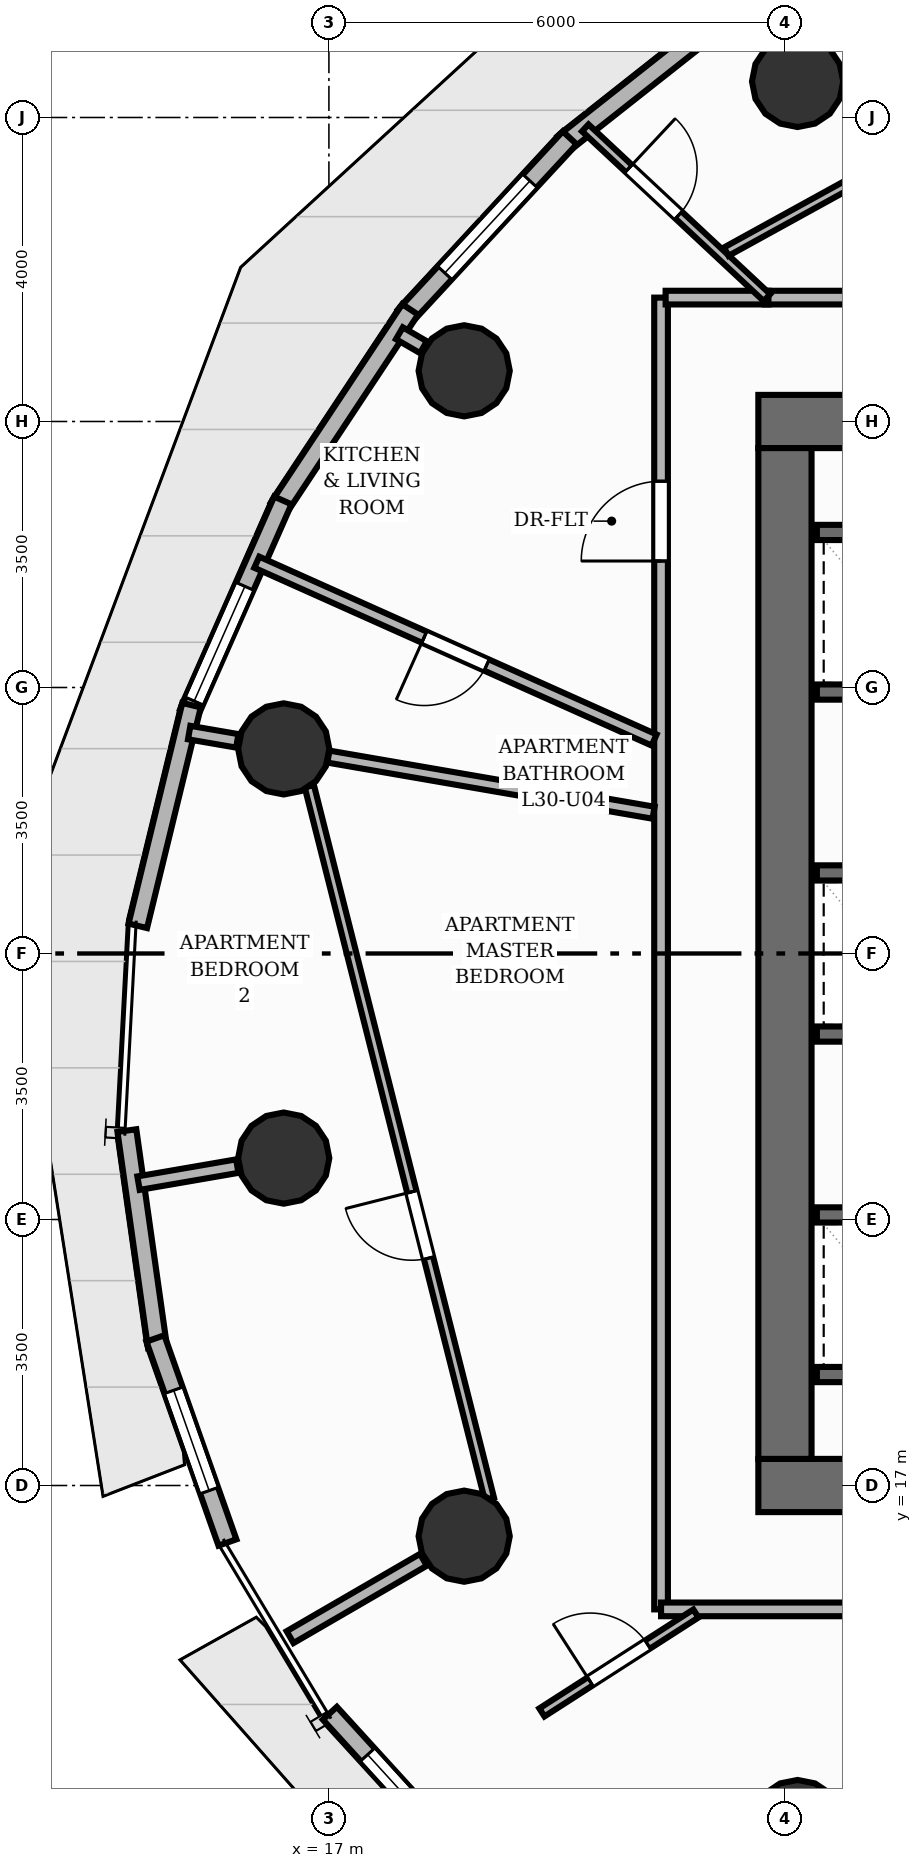
"""IFC4 building model, lengths in metres.
Left out: names, types, materials, properties, quantities, classifications, styles, units other than length and angle.
Written with IfcOpenShell. Run it as: python <this file> out.ifc"""

import sys

from ifc_helpers import new_model, si_unit, direction, frame, frame_2d, origin, origin_2d, place, context, subcontext, project, spatial, rectangle, circle, extrude, element, fill, save


model = new_model("IFC4")
c1 = context("Model", 3, precision=1e-05, world=origin(), true_north=direction((0.0, 1.0)))
c2 = subcontext(c1, "Body", "Model", "MODEL_VIEW")
j1 = project(units=[si_unit("LENGTHUNIT", "METRE"), si_unit("PLANEANGLEUNIT", "RADIAN")], contexts=[c1])
p1 = place(None, origin())
s1 = spatial("IfcSite", under=j1, at=p1, CompositionType="ELEMENT")
p2 = place(p1, origin())
s2 = spatial("IfcBuilding", under=s1, at=p2, CompositionType="ELEMENT")
p3 = place(p2, frame((0.0, 0.0, 102.88)))
s3 = spatial("IfcBuildingStorey", under=s2, at=p3, CompositionType="ELEMENT", Elevation=102.88)
p4 = place(p3, frame((22.65, 17.0, 0.0), z_axis=(0.0, 0.0, 1.0), x_axis=(1.0, 0.0, 0.0)))
e1 = element("IfcWall", 1, at=p4, inside=s3, PredefinedType="SHEAR", context=c2, shape_type="SweptSolid", body=[
    extrude(rectangle(XDim=18.7, YDim=0.7, at=frame_2d((9.35, 0.0))), origin(), (0.0, 0.0, 1.0), 3.2),
])
p5 = place(p4, frame((5.85, 0.0, 0.0)))
e2 = element("IfcOpeningElement", 2, at=p5, cuts=e1, PredefinedType="OPENING", context=c2, shape_type="SweptSolid", body=[
    extrude(rectangle(XDim=1.1, YDim=2.15, at=frame_2d((0.55, 1.075))), frame((0.0, 0.36, 0.0), z_axis=(0.0, -1.0, 0.0), x_axis=(1.0, 0.0, 0.0)), (0.0, 0.0, 1.0), 0.72),
])
p6 = place(p4, frame((9.4, 0.0, 0.0)))
e3 = element("IfcOpeningElement", 3, at=p6, cuts=e1, PredefinedType="OPENING", context=c2, shape_type="SweptSolid", body=[
    extrude(rectangle(XDim=0.9, YDim=2.1, at=frame_2d((0.45, 1.05))), frame((0.0, 0.36, 0.0), z_axis=(0.0, -1.0, 0.0), x_axis=(1.0, 0.0, 0.0)), (0.0, 0.0, 1.0), 0.72),
])
p7 = place(p3, frame((22.65, 31.0, 0.0), z_axis=(0.0, 0.0, 1.0), x_axis=(1.0, 0.0, 0.0)))
e4 = element("IfcWall", 4, at=p7, inside=s3, PredefinedType="SHEAR", context=c2, shape_type="SweptSolid", body=[
    extrude(rectangle(XDim=18.7, YDim=0.7, at=frame_2d((9.35, 0.0))), origin(), (0.0, 0.0, 1.0), 3.2),
])
p8 = place(p7, frame((11.75, 0.0, 0.0)))
e5 = element("IfcOpeningElement", 5, at=p8, cuts=e4, PredefinedType="OPENING", context=c2, shape_type="SweptSolid", body=[
    extrude(rectangle(XDim=1.1, YDim=2.15, at=frame_2d((0.55, 1.075))), frame((0.0, 0.36, 0.0), z_axis=(0.0, -1.0, 0.0), x_axis=(1.0, 0.0, 0.0)), (0.0, 0.0, 1.0), 0.72),
])
p9 = place(p3, frame((23.0, 17.35, 0.0), z_axis=(0.0, 0.0, 1.0), x_axis=(0.0, 1.0, 0.0)))
e6 = element("IfcWall", 6, at=p9, inside=s3, PredefinedType="SHEAR", context=c2, shape_type="SweptSolid", body=[
    extrude(rectangle(XDim=13.3, YDim=0.7, at=frame_2d((6.65, 0.0))), origin(), (0.0, 0.0, 1.0), 3.2),
])
for number, where, z_axis, x_axis in (
    (7, (23.167, 35.474, 0.0), (0.0, 0.0, 1.0), (1.0, 0.0, 0.0)),
    (8, (18.78, 31.667, 0.0), (0.0, 0.0, 1.0), (1.0, 0.0, 0.0)),
    (9, (16.406, 26.692, 0.0), (0.0, 0.0, 1.0), (1.0, 0.0, 0.0)),
    (10, (16.406, 21.308, 0.0), (0.0, 0.0, 1.0), (1.0, 0.0, 0.0)),
    (11, (18.78, 16.333, 0.0), (0.0, 0.0, 1.0), (1.0, 0.0, 0.0)),
    (12, (23.167, 12.526, 0.0), (0.0, 0.0, 1.0), (1.0, 0.0, 0.0)),
):
    element("IfcColumn", number, at=place(p3, frame(where, z_axis=z_axis, x_axis=x_axis)), inside=s3, PredefinedType="COLUMN", context=c2, shape_type="SweptSolid", body=[
        extrude(circle(Radius=0.6, at=origin_2d()), origin(), (0.0, 0.0, 1.0), 3.2),
    ])
p10 = place(p3, frame((20.088, 34.658, 0.0), z_axis=(0.0, 0.0, 1.0), x_axis=(0.784871179145, 0.619658964389, 0.0)))
e13 = element("IfcWall", 13, at=p10, inside=s3, PredefinedType="SOLIDWALL", context=c2, shape_type="SweptSolid", body=[
    extrude(rectangle(XDim=3.236, YDim=0.25, at=frame_2d((1.618, 0.0))), origin(), (0.0, 0.0, 1.0), 2.96),
])
p11 = place(p3, frame((18.001, 32.388, 0.0), z_axis=(0.0, 0.0, 1.0), x_axis=(0.678956449941, 0.734178547142, 0.0)))
e14 = element("IfcWall", 14, at=p11, inside=s3, PredefinedType="SOLIDWALL", context=c2, shape_type="SweptSolid", body=[
    extrude(rectangle(XDim=3.192, YDim=0.25, at=frame_2d((1.596, 0.0))), origin(), (0.0, 0.0, 1.0), 2.96),
])
p12 = place(p11, frame((0.771, 0.0, 0.85)))
e15 = element("IfcOpeningElement", 15, at=p12, cuts=e14, PredefinedType="OPENING", context=c2, shape_type="SweptSolid", body=[
    extrude(rectangle(XDim=1.65, YDim=1.55, at=frame_2d((0.825, 0.775))), frame((0.0, 0.135, 0.0), z_axis=(0.0, -1.0, 0.0), x_axis=(1.0, 0.0, 0.0)), (0.0, 0.0, 1.0), 0.27),
])
p13 = place(p3, frame((16.341, 29.864, 0.0), z_axis=(0.0, 0.0, 1.0), x_axis=(0.552034347266, 0.833821371421, 0.0)))
e16 = element("IfcWall", 16, at=p13, inside=s3, PredefinedType="SOLIDWALL", context=c2, shape_type="SweptSolid", body=[
    extrude(rectangle(XDim=3.131, YDim=0.25, at=frame_2d((1.565, 0.0))), origin(), (0.0, 0.0, 1.0), 2.96),
])
p14 = place(p3, frame((15.157, 27.162, 0.0), z_axis=(0.0, 0.0, 1.0), x_axis=(0.404109525311, 0.914710605357, 0.0)))
e17 = element("IfcWall", 17, at=p14, inside=s3, PredefinedType="SOLIDWALL", context=c2, shape_type="SweptSolid", body=[
    extrude(rectangle(XDim=3.061, YDim=0.25, at=frame_2d((1.53, 0.0))), origin(), (0.0, 0.0, 1.0), 2.96),
])
p15 = place(p14, frame((0.175, 0.0, 0.85)))
e18 = element("IfcOpeningElement", 18, at=p15, cuts=e17, PredefinedType="OPENING", context=c2, shape_type="SweptSolid", body=[
    extrude(rectangle(XDim=1.65, YDim=1.55, at=frame_2d((0.825, 0.775))), frame((0.0, 0.135, 0.0), z_axis=(0.0, -1.0, 0.0), x_axis=(1.0, 0.0, 0.0)), (0.0, 0.0, 1.0), 0.27),
])
p16 = place(p3, frame((14.486, 24.364, 0.0), z_axis=(0.0, 0.0, 1.0), x_axis=(0.236668427837, 0.971590477138, 0.0)))
e19 = element("IfcWall", 19, at=p16, inside=s3, PredefinedType="SOLIDWALL", context=c2, shape_type="SweptSolid", body=[
    extrude(rectangle(XDim=2.989, YDim=0.25, at=frame_2d((1.494, 0.0))), origin(), (0.0, 0.0, 1.0), 2.96),
])
p17 = place(p3, frame((14.744, 18.824, 0.0), z_axis=(0.0, 0.0, 1.0), x_axis=(-0.139982311006, 0.990154004489, 0.0)))
e20 = element("IfcWall", 20, at=p17, inside=s3, PredefinedType="SOLIDWALL", context=c2, shape_type="SweptSolid", body=[
    extrude(rectangle(XDim=2.874, YDim=0.25, at=frame_2d((1.437, 0.0))), origin(), (0.0, 0.0, 1.0), 2.96),
])
p18 = place(p3, frame((15.665, 16.25, 0.0), z_axis=(0.0, 0.0, 1.0), x_axis=(-0.332923265962, 0.942953921982, 0.0)))
e21 = element("IfcWall", 21, at=p18, inside=s3, PredefinedType="SOLIDWALL", context=c2, shape_type="SweptSolid", body=[
    extrude(rectangle(XDim=2.847, YDim=0.25, at=frame_2d((1.424, 0.0))), origin(), (0.0, 0.0, 1.0), 2.96),
])
p19 = place(p18, frame((0.724, 0.0, 0.85)))
e22 = element("IfcOpeningElement", 22, at=p19, cuts=e21, PredefinedType="OPENING", context=c2, shape_type="SweptSolid", body=[
    extrude(rectangle(XDim=1.4, YDim=1.55, at=frame_2d((0.7, 0.775))), frame((0.0, 0.135, 0.0), z_axis=(0.0, -1.0, 0.0), x_axis=(1.0, 0.0, 0.0)), (0.0, 0.0, 1.0), 0.27),
])
p20 = place(p3, frame((18.949, 11.879, 0.0), z_axis=(0.0, 0.0, 1.0), x_axis=(-0.673691100196, 0.739013059098, 0.0)))
e23 = element("IfcWall", 23, at=p20, inside=s3, PredefinedType="SOLIDWALL", context=c2, shape_type="SweptSolid", body=[
    extrude(rectangle(XDim=2.874, YDim=0.25, at=frame_2d((1.437, 0.0))), origin(), (0.0, 0.0, 1.0), 2.96),
])
p21 = place(p20, frame((0.737, 0.0, 0.85)))
e24 = element("IfcOpeningElement", 24, at=p21, cuts=e23, PredefinedType="OPENING", context=c2, shape_type="SweptSolid", body=[
    extrude(rectangle(XDim=1.4, YDim=1.55, at=frame_2d((0.7, 0.775))), frame((0.0, 0.135, 0.0), z_axis=(0.0, -1.0, 0.0), x_axis=(1.0, 0.0, 0.0)), (0.0, 0.0, 1.0), 0.27),
])
for number, where, z_axis, x_axis in (
    (25, (23.42, 18.46, 0.0), (0.0, 0.0, 1.0), (1.0, 0.0, 0.0)),
    (26, (23.42, 29.54, 0.0), (0.0, 0.0, 1.0), (1.0, 0.0, 0.0)),
    (27, (23.42, 20.56, 0.0), (0.0, 0.0, 1.0), (1.0, 0.0, 0.0)),
    (28, (23.42, 22.94, 0.0), (0.0, 0.0, 1.0), (1.0, 0.0, 0.0)),
    (29, (23.42, 25.06, 0.0), (0.0, 0.0, 1.0), (1.0, 0.0, 0.0)),
    (30, (23.42, 27.44, 0.0), (0.0, 0.0, 1.0), (1.0, 0.0, 0.0)),
):
    element("IfcWall", number, at=place(p3, frame(where, z_axis=z_axis, x_axis=x_axis)), inside=s3, PredefinedType="SHEAR", context=c2, shape_type="SweptSolid", body=[
        extrude(rectangle(XDim=1.71, YDim=0.2, at=frame_2d((0.855, 0.0))), origin(), (0.0, 0.0, 1.0), 3.2),
    ])
p22 = place(p3, frame((18.243, 31.978, 0.0), z_axis=(0.0, 0.0, 1.0), x_axis=(-0.864891917132, 0.501958137377, 0.0)))
e31 = element("IfcWall", 31, at=p22, inside=s3, PredefinedType="PARTITIONING", context=c2, shape_type="SweptSolid", body=[
    extrude(rectangle(XDim=0.365, YDim=0.18, at=frame_2d((0.183, 0.0))), origin(), (0.0, 0.0, 1.0), 2.261),
])
p23 = place(p3, frame((15.794, 26.798, 0.0), z_axis=(0.0, 0.0, 1.0), x_axis=(-0.985389793052, 0.170314285219, 0.0)))
e32 = element("IfcWall", 32, at=p23, inside=s3, PredefinedType="PARTITIONING", context=c2, shape_type="SweptSolid", body=[
    extrude(rectangle(XDim=0.642, YDim=0.18, at=frame_2d((0.321, 0.0))), origin(), (0.0, 0.0, 1.0), 2.261),
])
p24 = place(p3, frame((15.794, 21.202, 0.0), z_axis=(0.0, 0.0, 1.0), x_axis=(-0.98541625201, -0.170161130326, 0.0)))
e33 = element("IfcWall", 33, at=p24, inside=s3, PredefinedType="PARTITIONING", context=c2, shape_type="SweptSolid", body=[
    extrude(rectangle(XDim=1.319, YDim=0.18, at=frame_2d((0.659, 0.0))), origin(), (0.0, 0.0, 1.0), 2.261),
])
p25 = place(p3, frame((18.243, 16.022, 0.0), z_axis=(0.0, 0.0, 1.0), x_axis=(-0.865046864493, -0.501691062539, 0.0)))
e34 = element("IfcWall", 34, at=p25, inside=s3, PredefinedType="PARTITIONING", context=c2, shape_type="SweptSolid", body=[
    extrude(rectangle(XDim=2.028, YDim=0.18, at=frame_2d((1.014, 0.0))), origin(), (0.0, 0.0, 1.0), 2.261),
])
p26 = place(p3, frame((22.734, 32.63, 0.0), z_axis=(0.0, 0.0, 1.0), x_axis=(1.0, 0.0, 0.0)))
e35 = element("IfcWall", 35, at=p26, inside=s3, PredefinedType="PARTITIONING", context=c2, shape_type="SweptSolid", body=[
    extrude(rectangle(XDim=19.896, YDim=0.18, at=frame_2d((9.948, 0.0))), origin(), (0.0, 0.0, 1.0), 2.955),
])
p27 = place(p26, frame((11.004, 0.0, 0.0)))
e36 = element("IfcOpeningElement", 36, at=p27, cuts=e35, PredefinedType="OPENING", context=c2, shape_type="SweptSolid", body=[
    extrude(rectangle(XDim=1.05, YDim=2.15, at=frame_2d((0.525, 1.075))), frame((0.0, 0.1, 0.0), z_axis=(0.0, -1.0, 0.0), x_axis=(1.0, 0.0, 0.0)), (0.0, 0.0, 1.0), 0.2),
])
p28 = place(p3, frame((21.37, 15.37, 0.0), z_axis=(0.0, 0.0, 1.0), x_axis=(0.0, 1.0, 0.0)))
e37 = element("IfcWall", 37, at=p28, inside=s3, PredefinedType="PARTITIONING", context=c2, shape_type="SweptSolid", body=[
    extrude(rectangle(XDim=17.26, YDim=0.18, at=frame_2d((8.63, 0.0))), origin(), (0.0, 0.0, 1.0), 2.955),
])
p29 = place(p28, frame((13.794, 0.0, 0.0)))
e38 = element("IfcOpeningElement", 38, at=p29, cuts=e37, PredefinedType="OPENING", context=c2, shape_type="SweptSolid", body=[
    extrude(rectangle(XDim=1.05, YDim=2.15, at=frame_2d((0.525, 1.075))), frame((0.0, 0.1, 0.0), z_axis=(0.0, -1.0, 0.0), x_axis=(1.0, 0.0, 0.0)), (0.0, 0.0, 1.0), 0.2),
])
p30 = place(p3, frame((21.43, 32.63, 0.0), z_axis=(0.0, 0.0, 1.0), x_axis=(1.0, 0.0, 0.0)))
e39 = element("IfcWall", 39, at=p30, inside=s3, PredefinedType="PARTITIONING", context=c2, shape_type="SweptSolid", body=[
    extrude(rectangle(XDim=1.353, YDim=0.18, at=frame_2d((0.677, 0.0))), origin(), (0.0, 0.0, 1.0), 2.955),
])
p31 = place(p3, frame((28.325, 15.37, 0.0), z_axis=(0.0, 0.0, 1.0), x_axis=(-1.0, 0.0, 0.0)))
e40 = element("IfcWall", 40, at=p31, inside=s3, PredefinedType="PARTITIONING", context=c2, shape_type="SweptSolid", body=[
    extrude(rectangle(XDim=6.955, YDim=0.18, at=frame_2d((3.478, 0.0))), origin(), (0.0, 0.0, 1.0), 2.955),
])
p32 = place(p31, frame((2.7, 0.0, 0.0)))
e41 = element("IfcOpeningElement", 41, at=p32, cuts=e40, PredefinedType="OPENING", context=c2, shape_type="SweptSolid", body=[
    extrude(rectangle(XDim=1.05, YDim=2.15, at=frame_2d((0.525, 1.075))), frame((0.0, 0.1, 0.0), z_axis=(0.0, -1.0, 0.0), x_axis=(1.0, 0.0, 0.0)), (0.0, 0.0, 1.0), 0.2),
])
p33 = place(p3, frame((21.279, 26.809, 0.0), z_axis=(0.0, 0.0, 1.0), x_axis=(-0.912794415037, 0.408419338275, 0.0)))
e42 = element("IfcWall", 42, at=p33, inside=s3, PredefinedType="PLUMBINGWALL", context=c2, shape_type="SweptSolid", body=[
    extrude(rectangle(XDim=5.727, YDim=0.16, at=frame_2d((2.864, 0.0))), origin(), (0.0, 0.0, 1.0), 2.642),
])
p34 = place(p33, frame((2.414, 0.0, 0.0)))
e43 = element("IfcOpeningElement", 43, at=p34, cuts=e42, PredefinedType="OPENING", context=c2, shape_type="SweptSolid", body=[
    extrude(rectangle(XDim=0.9, YDim=2.1, at=frame_2d((0.45, 1.05))), frame((0.0, 0.09, 0.0), z_axis=(0.0, -1.0, 0.0), x_axis=(1.0, 0.0, 0.0)), (0.0, 0.0, 1.0), 0.18),
])
p35 = place(p3, frame((20.373, 34.863, 0.0), z_axis=(0.0, 0.0, 1.0), x_axis=(0.730692833249, -0.682706366924, 0.0)))
e44 = element("IfcWall", 44, at=p35, inside=s3, PredefinedType="PARTITIONING", context=c2, shape_type="SweptSolid", body=[
    extrude(rectangle(XDim=3.271, YDim=0.125, at=frame_2d((1.636, 0.0))), origin(), (0.0, 0.0, 1.0), 2.955),
])
p36 = place(p35, frame((0.781, 0.0, 0.0)))
e45 = element("IfcOpeningElement", 45, at=p36, cuts=e44, PredefinedType="OPENING", context=c2, shape_type="SweptSolid", body=[
    extrude(rectangle(XDim=0.9, YDim=2.1, at=frame_2d((0.45, 1.05))), frame((0.0, 0.073, 0.0), z_axis=(0.0, -1.0, 0.0), x_axis=(1.0, 0.0, 0.0)), (0.0, 0.0, 1.0), 0.145),
])
p37 = place(p3, frame((21.271, 25.852, 0.0), z_axis=(0.0, 0.0, 1.0), x_axis=(-0.985414949705, 0.170168671906, 0.0)))
e46 = element("IfcWall", 46, at=p37, inside=s3, PredefinedType="PLUMBINGWALL", context=c2, shape_type="SweptSolid", body=[
    extrude(rectangle(XDim=4.341, YDim=0.16, at=frame_2d((2.171, 0.0))), origin(), (0.0, 0.0, 1.0), 2.261),
])
p38 = place(p3, frame((28.894, 36.907, 0.0), z_axis=(0.0, 0.0, 1.0), x_axis=(-0.875900786778, -0.482491255591, 0.0)))
e47 = element("IfcWall", 47, at=p38, inside=s3, PredefinedType="PARTITIONING", context=c2, shape_type="SweptSolid", body=[
    extrude(rectangle(XDim=7.611, YDim=0.125, at=frame_2d((3.805, 0.0))), origin(), (0.0, 0.0, 1.0), 2.955),
])
p39 = place(p38, frame((3.355, 0.0, 0.0)))
e48 = element("IfcOpeningElement", 48, at=p39, cuts=e47, PredefinedType="OPENING", context=c2, shape_type="SweptSolid", body=[
    extrude(rectangle(XDim=0.9, YDim=2.1, at=frame_2d((0.45, 1.05))), frame((0.0, 0.073, 0.0), z_axis=(0.0, -1.0, 0.0), x_axis=(1.0, 0.0, 0.0)), (0.0, 0.0, 1.0), 0.145),
])
p40 = place(p3, frame((19.802, 14.014, 0.0), z_axis=(0.0, 0.0, 1.0), x_axis=(0.841349696578, 0.540491154477, 0.0)))
e49 = element("IfcWall", 49, at=p40, inside=s3, PredefinedType="PARTITIONING", context=c2, shape_type="SweptSolid", body=[
    extrude(rectangle(XDim=2.408, YDim=0.125, at=frame_2d((1.204, 0.0))), origin(), (0.0, 0.0, 1.0), 2.955),
])
p41 = place(p40, frame((0.754, 0.0, 0.0)))
e50 = element("IfcOpeningElement", 50, at=p41, cuts=e49, PredefinedType="OPENING", context=c2, shape_type="SweptSolid", body=[
    extrude(rectangle(XDim=0.9, YDim=2.1, at=frame_2d((0.45, 1.05))), frame((0.0, 0.073, 0.0), z_axis=(0.0, -1.0, 0.0), x_axis=(1.0, 0.0, 0.0)), (0.0, 0.0, 1.0), 0.145),
])
p42 = place(p3, frame((19.111, 16.826, 0.0), z_axis=(0.0, 0.0, 1.0), x_axis=(-0.244982180272, 0.969527581531, 0.0)))
e51 = element("IfcWall", 51, at=p42, inside=s3, PredefinedType="PARTITIONING", context=c2, shape_type="SweptSolid", body=[
    extrude(rectangle(XDim=9.671, YDim=0.125, at=frame_2d((4.835, 0.0))), origin(), (0.0, 0.0, 1.0), 2.955),
])
p43 = place(p42, frame((3.265, 0.0, 0.0)))
e52 = element("IfcOpeningElement", 52, at=p43, cuts=e51, PredefinedType="OPENING", context=c2, shape_type="SweptSolid", body=[
    extrude(rectangle(XDim=0.9, YDim=2.1, at=frame_2d((0.45, 1.05))), frame((0.0, 0.073, 0.0), z_axis=(0.0, -1.0, 0.0), x_axis=(1.0, 0.0, 0.0)), (0.0, 0.0, 1.0), 0.145),
])
p44 = place(p12, origin())
e53 = element("IfcWindow", 53, at=p44, inside=s3, PartitioningType="SINGLE_PANEL", PredefinedType="WINDOW", context=c2, shape_type="SweptSolid", body=[
    extrude(rectangle(XDim=1.65, YDim=1.55, at=frame_2d((0.825, 0.775))), frame((0.0, 0.03, 0.0), z_axis=(0.0, -1.0, 0.0), x_axis=(1.0, 0.0, 0.0)), (0.0, 0.0, 1.0), 0.06),
])
fill(e15, e53)
p45 = place(p15, origin())
e54 = element("IfcWindow", 54, at=p45, inside=s3, PartitioningType="SINGLE_PANEL", PredefinedType="WINDOW", context=c2, shape_type="SweptSolid", body=[
    extrude(rectangle(XDim=1.65, YDim=1.55, at=frame_2d((0.825, 0.775))), frame((0.0, 0.03, 0.0), z_axis=(0.0, -1.0, 0.0), x_axis=(1.0, 0.0, 0.0)), (0.0, 0.0, 1.0), 0.06),
])
fill(e18, e54)
p46 = place(p19, origin())
e55 = element("IfcWindow", 55, at=p46, inside=s3, PartitioningType="SINGLE_PANEL", PredefinedType="WINDOW", context=c2, shape_type="SweptSolid", body=[
    extrude(rectangle(XDim=1.4, YDim=1.55, at=frame_2d((0.7, 0.775))), frame((0.0, 0.03, 0.0), z_axis=(0.0, -1.0, 0.0), x_axis=(1.0, 0.0, 0.0)), (0.0, 0.0, 1.0), 0.06),
])
fill(e22, e55)
p47 = place(p21, origin())
e56 = element("IfcWindow", 56, at=p47, inside=s3, PartitioningType="SINGLE_PANEL", PredefinedType="WINDOW", context=c2, shape_type="SweptSolid", body=[
    extrude(rectangle(XDim=1.4, YDim=1.55, at=frame_2d((0.7, 0.775))), frame((0.0, 0.03, 0.0), z_axis=(0.0, -1.0, 0.0), x_axis=(1.0, 0.0, 0.0)), (0.0, 0.0, 1.0), 0.06),
])
fill(e24, e56)
p48 = place(p29, origin())
e57 = element("IfcDoor", 57, at=p48, inside=s3, OperationType="SINGLE_SWING_LEFT", PredefinedType="DOOR", context=c2, shape_type="SweptSolid", body=[
    extrude(rectangle(XDim=1.05, YDim=2.15, at=frame_2d((0.525, 1.075))), frame((0.0, 0.025, 0.0), z_axis=(0.0, -1.0, 0.0), x_axis=(1.0, 0.0, 0.0)), (0.0, 0.0, 1.0), 0.05),
])
fill(e38, e57)
p49 = place(p34, origin())
e58 = element("IfcDoor", 58, at=p49, inside=s3, OperationType="SINGLE_SWING_RIGHT", PredefinedType="DOOR", context=c2, shape_type="SweptSolid", body=[
    extrude(rectangle(XDim=0.9, YDim=2.1, at=frame_2d((0.45, 1.05))), frame((0.0, 0.025, 0.0), z_axis=(0.0, -1.0, 0.0), x_axis=(1.0, 0.0, 0.0)), (0.0, 0.0, 1.0), 0.05),
])
fill(e43, e58)
p50 = place(p36, origin())
e59 = element("IfcDoor", 59, at=p50, inside=s3, OperationType="SINGLE_SWING_LEFT", PredefinedType="DOOR", context=c2, shape_type="SweptSolid", body=[
    extrude(rectangle(XDim=0.9, YDim=2.1, at=frame_2d((0.45, 1.05))), frame((0.0, 0.025, 0.0), z_axis=(0.0, -1.0, 0.0), x_axis=(1.0, 0.0, 0.0)), (0.0, 0.0, 1.0), 0.05),
])
fill(e45, e59)
p51 = place(p41, origin())
e60 = element("IfcDoor", 60, at=p51, inside=s3, OperationType="SINGLE_SWING_LEFT", PredefinedType="DOOR", context=c2, shape_type="SweptSolid", body=[
    extrude(rectangle(XDim=0.9, YDim=2.1, at=frame_2d((0.45, 1.05))), frame((0.0, 0.025, 0.0), z_axis=(0.0, -1.0, 0.0), x_axis=(1.0, 0.0, 0.0)), (0.0, 0.0, 1.0), 0.05),
])
fill(e50, e60)
p52 = place(p43, origin())
e61 = element("IfcDoor", 61, at=p52, inside=s3, OperationType="SINGLE_SWING_RIGHT", PredefinedType="DOOR", context=c2, shape_type="SweptSolid", body=[
    extrude(rectangle(XDim=0.9, YDim=2.1, at=frame_2d((0.45, 1.05))), frame((0.0, 0.025, 0.0), z_axis=(0.0, -1.0, 0.0), x_axis=(1.0, 0.0, 0.0)), (0.0, 0.0, 1.0), 0.05),
])
fill(e52, e61)
save(model, sys.argv[1])
